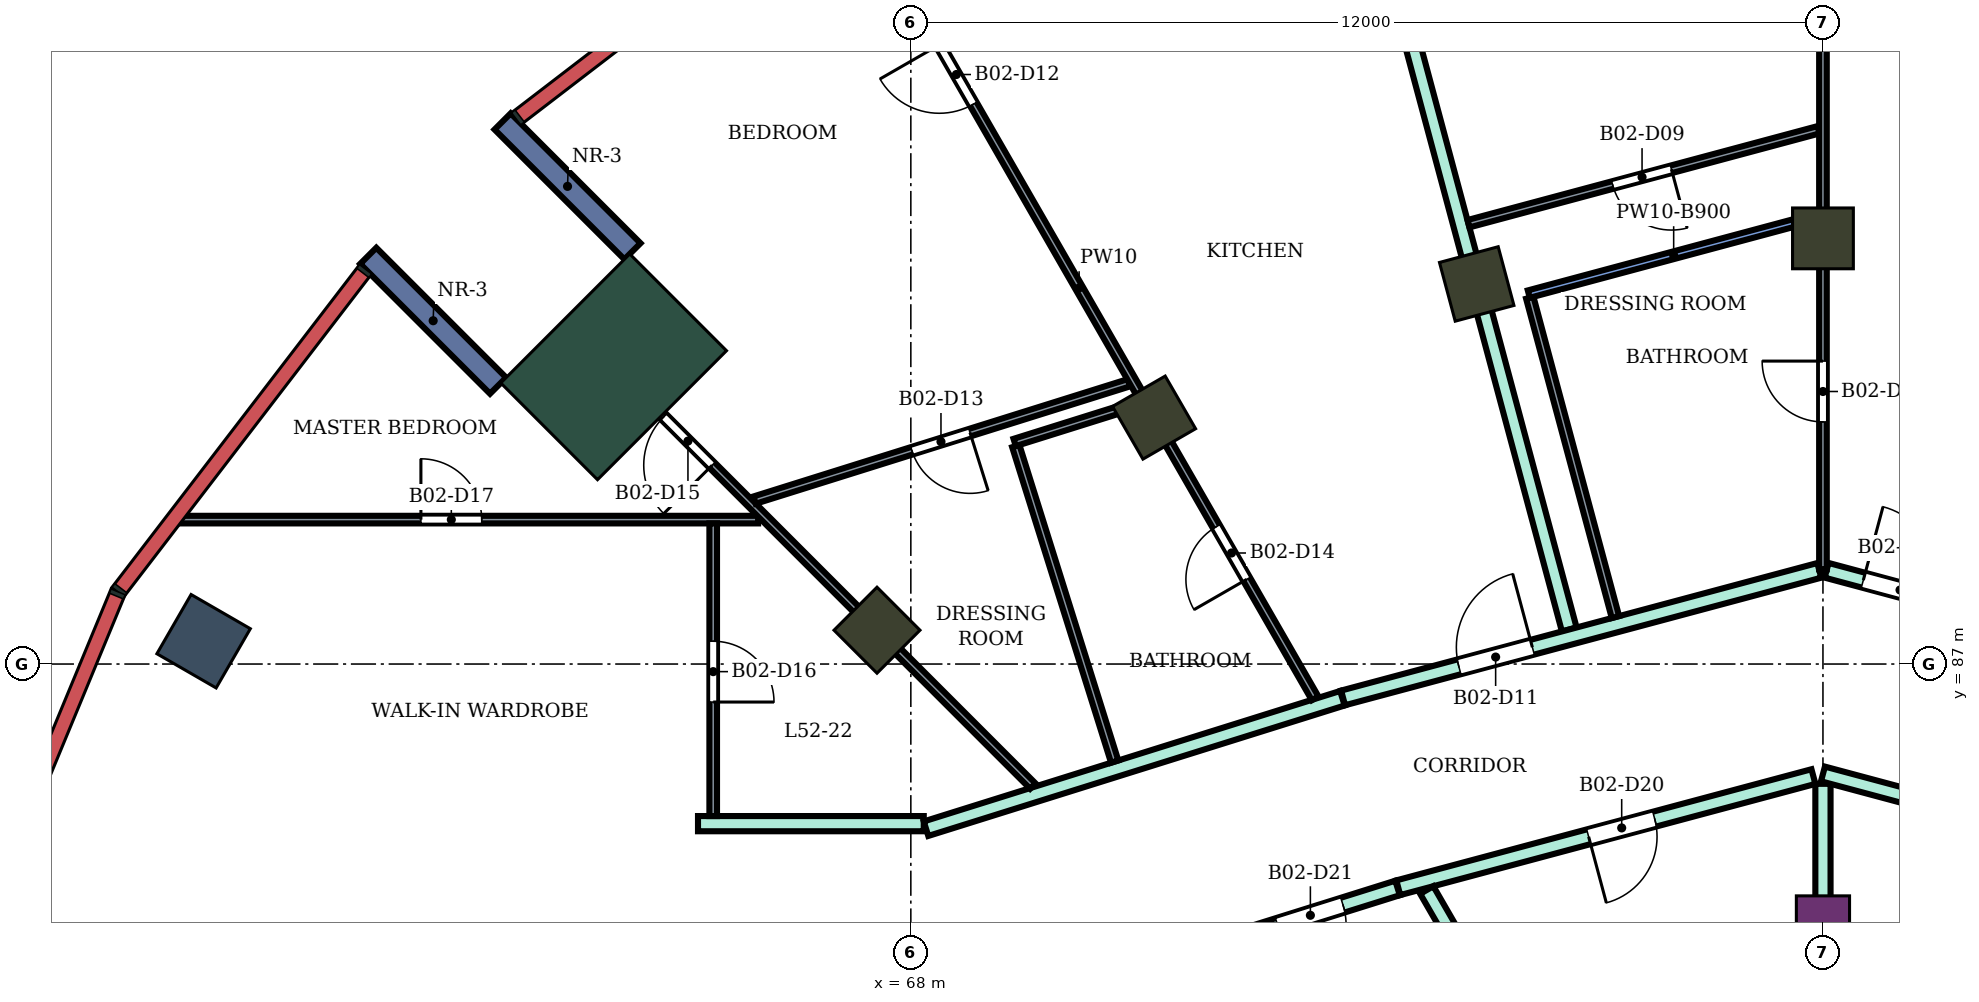
"""IFC4 building model, lengths in metres.
Left out: names, types, materials, properties, quantities, classifications, styles, units other than length and angle.
Written with IfcOpenShell. Run it as: python <this file> out.ifc"""

import sys

from ifc_helpers import new_model, si_unit, direction, frame, frame_2d, origin, origin_2d, place, context, subcontext, project, spatial, rectangle, extrude, element, fill, save


model = new_model("IFC4")
c1 = context("Model", 3, precision=1e-05, world=origin(), true_north=direction((0.0, 1.0)))
c2 = subcontext(c1, "Body", "Model", "MODEL_VIEW")
j1 = project(units=[si_unit("LENGTHUNIT", "METRE"), si_unit("PLANEANGLEUNIT", "RADIAN")], contexts=[c1])
p1 = place(None, origin())
s1 = spatial("IfcSite", under=j1, at=p1, CompositionType="ELEMENT")
p2 = place(p1, origin())
s2 = spatial("IfcBuilding", under=s1, at=p2, CompositionType="ELEMENT")
p3 = place(p2, frame((0.0, 0.0, 225.1)))
s3 = spatial("IfcBuildingStorey", under=s2, at=p3, CompositionType="ELEMENT", Elevation=225.1)
p4 = place(p3, frame((58.696, 87.3, 0.0), z_axis=(0.0, 0.0, 1.0), x_axis=(-0.866025403784, 0.5, 0.0)))
e1 = element("IfcColumn", 1, at=p4, inside=s3, PredefinedType="COLUMN", context=c2, shape_type="SweptSolid", body=[
    extrude(rectangle(XDim=0.9, YDim=0.9, at=origin_2d()), origin(), (0.0, 0.0, 1.0), 4.2),
])
for number, where, z_axis, x_axis in (
    (2, (80.0, 92.6, 0.0), (0.0, 0.0, 1.0), (0.0, 1.0, 0.0)),
    (3, (75.445, 92.0, 0.0), (0.0, 0.0, 1.0), (-0.259, 0.966, 0.0)),
    (4, (71.2, 90.242, 0.0), (0.0, 0.0, 1.0), (-0.5, 0.866, 0.0)),
    (5, (67.555, 87.445, 0.0), (0.0, 0.0, 1.0), (-0.707, 0.707, 0.0)),
):
    element("IfcColumn", number, at=place(p3, frame(where, z_axis=z_axis, x_axis=x_axis)), inside=s3, PredefinedType="COLUMN", context=c2, shape_type="SweptSolid", body=[
        extrude(rectangle(XDim=0.8, YDim=0.8, at=origin_2d()), origin(), (0.0, 0.0, 1.0), 4.2),
    ])
p5 = place(p3, frame((80.0, 83.6, 0.0), z_axis=(0.0, 0.0, 1.0), x_axis=(0.0, 1.0, 0.0)))
e6 = element("IfcColumn", 6, at=p5, inside=s3, PredefinedType="COLUMN", context=c2, shape_type="SweptSolid", body=[
    extrude(rectangle(XDim=0.7, YDim=0.7, at=origin_2d()), origin(), (0.0, 0.0, 1.0), 4.2),
])
p6 = place(p3, frame((64.09, 90.91, 0.0), z_axis=(0.0, 0.0, 1.0), x_axis=(-0.707106781187, 0.707106781187, 0.0)))
e7 = element("IfcColumn", 7, at=p6, inside=s3, PredefinedType="COLUMN", context=c2, shape_type="SweptSolid", body=[
    extrude(rectangle(XDim=1.8, YDim=2.4, at=origin_2d()), origin(), (0.0, 0.0, 1.0), 4.2),
])
for number, where, z_axis, x_axis in (
    (8, (64.338, 92.43, 0.0), (0.0, 0.0, 1.0), (-0.707, 0.707, 0.0)),
    (9, (62.57, 90.662, 0.0), (0.0, 0.0, 1.0), (-0.707, 0.707, 0.0)),
):
    element("IfcWall", number, at=place(p3, frame(where, z_axis=z_axis, x_axis=x_axis)), inside=s3, PredefinedType="NOTDEFINED", context=c2, shape_type="SweptSolid", body=[
        extrude(rectangle(XDim=2.416, YDim=0.3, at=frame_2d((1.208, 0.0))), origin(), (0.0, 0.0, 1.0), 4.2),
    ])
p7 = place(p3, frame((65.2, 84.9, 0.0), z_axis=(0.0, 0.0, 1.0), x_axis=(1.0, 0.0, 0.0)))
e10 = element("IfcWall", 10, at=p7, inside=s3, PredefinedType="PARTITIONING", context=c2, shape_type="SweptSolid", body=[
    extrude(rectangle(XDim=2.97, YDim=0.2, at=frame_2d((1.485, 0.0))), origin(), (0.0, 0.0, 1.0), 3.75),
])
p8 = place(p3, frame((68.2, 84.834, 0.0), z_axis=(0.0, 0.0, 1.0), x_axis=(0.954260265251, 0.298977166624, 0.0)))
e11 = element("IfcWall", 11, at=p8, inside=s3, PredefinedType="PARTITIONING", context=c2, shape_type="SweptSolid", body=[
    extrude(rectangle(XDim=5.741, YDim=0.2, at=frame_2d((2.87, 0.0))), origin(), (0.0, 0.0, 1.0), 3.75),
])
p9 = place(p3, frame((72.1, 83.332, 0.0), z_axis=(0.0, 0.0, 1.0), x_axis=(0.954233106619, 0.299063836383, 0.0)))
e12 = element("IfcWall", 12, at=p9, inside=s3, PredefinedType="PARTITIONING", context=c2, shape_type="SweptSolid", body=[
    extrude(rectangle(XDim=2.414, YDim=0.2, at=frame_2d((1.207, 0.0))), origin(), (0.0, 0.0, 1.0), 3.75),
])
p10 = place(p9, frame((0.762, 0.0, 0.0)))
e13 = element("IfcOpeningElement", 13, at=p10, cuts=e12, PredefinedType="OPENING", context=c2, shape_type="SweptSolid", body=[
    extrude(rectangle(XDim=0.9, YDim=2.1, at=frame_2d((0.45, 1.05))), frame((0.0, 0.11, 0.0), z_axis=(0.0, -1.0, 0.0), x_axis=(1.0, 0.0, 0.0)), (0.0, 0.0, 1.0), 0.22),
])
p11 = place(p3, frame((73.323, 99.919, 0.0), z_axis=(0.0, 0.0, 1.0), x_axis=(0.258768239436, -0.965939438194, 0.0)))
e14 = element("IfcWall", 14, at=p11, inside=s3, PredefinedType="PARTITIONING", context=c2, shape_type="SweptSolid", body=[
    extrude(rectangle(XDim=12.904, YDim=0.2, at=frame_2d((6.452, 0.0))), origin(), (0.0, 0.0, 1.0), 3.75),
])
p12 = place(p3, frame((73.687, 86.554, 0.0), z_axis=(0.0, 0.0, 1.0), x_axis=(0.96595258731, 0.258719150952, 0.0)))
e15 = element("IfcWall", 15, at=p12, inside=s3, PredefinedType="PARTITIONING", context=c2, shape_type="SweptSolid", body=[
    extrude(rectangle(XDim=6.486, YDim=0.2, at=frame_2d((3.243, 0.0))), origin(), (0.0, 0.0, 1.0), 3.75),
])
p13 = place(p12, frame((1.578, 0.0, 0.0)))
e16 = element("IfcOpeningElement", 16, at=p13, cuts=e15, PredefinedType="OPENING", context=c2, shape_type="SweptSolid", body=[
    extrude(rectangle(XDim=1.0, YDim=2.1, at=frame_2d((0.5, 1.05))), frame((0.0, 0.11, 0.0), z_axis=(0.0, -1.0, 0.0), x_axis=(1.0, 0.0, 0.0)), (0.0, 0.0, 1.0), 0.22),
])
p14 = place(p3, frame((74.413, 84.057, 0.0), z_axis=(0.0, 0.0, 1.0), x_axis=(0.965972135939, 0.258646153246, 0.0)))
e17 = element("IfcWall", 17, at=p14, inside=s3, PredefinedType="PARTITIONING", context=c2, shape_type="SweptSolid", body=[
    extrude(rectangle(XDim=5.654, YDim=0.2, at=frame_2d((2.827, 0.0))), origin(), (0.0, 0.0, 1.0), 3.75),
])
p15 = place(p14, frame((2.593, 0.0, 0.0)))
e18 = element("IfcOpeningElement", 18, at=p15, cuts=e17, PredefinedType="OPENING", context=c2, shape_type="SweptSolid", body=[
    extrude(rectangle(XDim=0.9, YDim=2.1, at=frame_2d((0.45, 1.05))), frame((0.0, 0.11, 0.0), z_axis=(0.0, -1.0, 0.0), x_axis=(1.0, 0.0, 0.0)), (0.0, 0.0, 1.0), 0.22),
])
p16 = place(p3, frame((74.787, 84.027, 0.0), z_axis=(0.0, 0.0, 1.0), x_axis=(0.500079107518, -0.86597972622, 0.0)))
e19 = element("IfcWall", 19, at=p16, inside=s3, PredefinedType="PARTITIONING", context=c2, shape_type="SweptSolid", body=[
    extrude(rectangle(XDim=2.726, YDim=0.2, at=frame_2d((1.363, 0.0))), origin(), (0.0, 0.0, 1.0), 3.75),
])
p17 = place(p3, frame((80.0, 82.699, 0.0), z_axis=(0.0, 0.0, 1.0), x_axis=(0.0, 1.0, 0.0)))
e20 = element("IfcWall", 20, at=p17, inside=s3, PredefinedType="PARTITIONING", context=c2, shape_type="SweptSolid", body=[
    extrude(rectangle(XDim=2.725, YDim=0.2, at=frame_2d((1.363, 0.0))), origin(), (0.0, 0.0, 1.0), 3.75),
])
p18 = place(p3, frame((80.0, 85.554, 0.0), z_axis=(0.0, 0.0, 1.0), x_axis=(0.965928989968, -0.258807237802, 0.0)))
e21 = element("IfcWall", 21, at=p18, inside=s3, PredefinedType="PARTITIONING", context=c2, shape_type="SweptSolid", body=[
    extrude(rectangle(XDim=5.774, YDim=0.2, at=frame_2d((2.887, 0.0))), origin(), (0.0, 0.0, 1.0), 3.75),
])
p19 = place(p18, frame((2.292, 0.0, 0.0)))
e22 = element("IfcOpeningElement", 22, at=p19, cuts=e21, PredefinedType="OPENING", context=c2, shape_type="SweptSolid", body=[
    extrude(rectangle(XDim=0.9, YDim=2.1, at=frame_2d((0.45, 1.05))), frame((0.0, 0.11, 0.0), z_axis=(0.0, -1.0, 0.0), x_axis=(1.0, 0.0, 0.0)), (0.0, 0.0, 1.0), 0.22),
])
p20 = place(p3, frame((80.048, 88.233, 0.0), z_axis=(0.0, 0.0, 1.0), x_axis=(0.965865387308, -0.259044501198, 0.0)))
e23 = element("IfcWall", 23, at=p20, inside=s3, PredefinedType="PARTITIONING", context=c2, shape_type="SweptSolid", body=[
    extrude(rectangle(XDim=6.476, YDim=0.2, at=frame_2d((3.238, 0.0))), origin(), (0.0, 0.0, 1.0), 3.75),
])
p21 = place(p20, frame((0.5, 0.0, 0.0)))
e24 = element("IfcOpeningElement", 24, at=p21, cuts=e23, PredefinedType="OPENING", context=c2, shape_type="SweptSolid", body=[
    extrude(rectangle(XDim=1.0, YDim=2.1, at=frame_2d((0.5, 1.05))), frame((0.0, 0.11, 0.0), z_axis=(0.0, -1.0, 0.0), x_axis=(1.0, 0.0, 0.0)), (0.0, 0.0, 1.0), 0.22),
])
p22 = place(p3, frame((58.379, 88.9, 0.0), z_axis=(0.0, 0.0, 1.0), x_axis=(1.0, 0.0, 0.0)))
e25 = element("IfcWall", 25, at=p22, inside=s3, PredefinedType="PARTITIONING", context=c2, shape_type="SweptSolid", body=[
    extrude(rectangle(XDim=7.612, YDim=0.1, at=frame_2d((3.806, 0.0))), origin(), (0.0, 0.0, 1.0), 3.75),
])
p23 = place(p22, frame((3.176, 0.0, 0.0)))
e26 = element("IfcOpeningElement", 26, at=p23, cuts=e25, PredefinedType="OPENING", context=c2, shape_type="SweptSolid", body=[
    extrude(rectangle(XDim=0.8, YDim=2.1, at=frame_2d((0.4, 1.05))), frame((0.0, 0.06, 0.0), z_axis=(0.0, -1.0, 0.0), x_axis=(1.0, 0.0, 0.0)), (0.0, 0.0, 1.0), 0.12),
])
p24 = place(p3, frame((63.596, 91.406, 0.0), z_axis=(0.0, 0.0, 1.0), x_axis=(0.70700623685, -0.707207311228, 0.0)))
e27 = element("IfcWall", 27, at=p24, inside=s3, PredefinedType="PARTITIONING", context=c2, shape_type="SweptSolid", body=[
    extrude(rectangle(XDim=8.499, YDim=0.1, at=frame_2d((4.25, 0.0))), origin(), (0.0, 0.0, 1.0), 3.75),
])
p25 = place(p24, frame((1.632, 0.0, 0.0)))
e28 = element("IfcOpeningElement", 28, at=p25, cuts=e27, PredefinedType="OPENING", context=c2, shape_type="SweptSolid", body=[
    extrude(rectangle(XDim=0.9, YDim=2.1, at=frame_2d((0.45, 1.05))), frame((0.0, 0.06, 0.0), z_axis=(0.0, -1.0, 0.0), x_axis=(1.0, 0.0, 0.0)), (0.0, 0.0, 1.0), 0.12),
])
p26 = place(p3, frame((65.4, 85.0, 0.0), z_axis=(0.0, 0.0, 1.0), x_axis=(0.0, 1.0, 0.0)))
e29 = element("IfcWall", 29, at=p26, inside=s3, PredefinedType="PARTITIONING", context=c2, shape_type="SweptSolid", body=[
    extrude(rectangle(XDim=3.85, YDim=0.1, at=frame_2d((1.925, 0.0))), origin(), (0.0, 0.0, 1.0), 3.75),
])
p27 = place(p26, frame((1.5, 0.0, 0.0)))
e30 = element("IfcOpeningElement", 30, at=p27, cuts=e29, PredefinedType="OPENING", context=c2, shape_type="SweptSolid", body=[
    extrude(rectangle(XDim=0.8, YDim=2.1, at=frame_2d((0.4, 1.05))), frame((0.0, 0.06, 0.0), z_axis=(0.0, -1.0, 0.0), x_axis=(1.0, 0.0, 0.0)), (0.0, 0.0, 1.0), 0.12),
])
p28 = place(p3, frame((65.944, 89.157, 0.0), z_axis=(0.0, 0.0, 1.0), x_axis=(0.954235485309, 0.299056246512, 0.0)))
e31 = element("IfcWall", 31, at=p28, inside=s3, PredefinedType="PARTITIONING", context=c2, shape_type="SweptSolid", body=[
    extrude(rectangle(XDim=5.159, YDim=0.1, at=frame_2d((2.58, 0.0))), origin(), (0.0, 0.0, 1.0), 3.75),
])
p29 = place(p28, frame((2.17, 0.0, 0.0)))
e32 = element("IfcOpeningElement", 32, at=p29, cuts=e31, PredefinedType="OPENING", context=c2, shape_type="SweptSolid", body=[
    extrude(rectangle(XDim=0.8, YDim=2.1, at=frame_2d((0.4, 1.05))), frame((0.0, 0.06, 0.0), z_axis=(0.0, -1.0, 0.0), x_axis=(1.0, 0.0, 0.0)), (0.0, 0.0, 1.0), 0.12),
])
p30 = place(p3, frame((67.109, 97.346, 0.0), z_axis=(0.0, 0.0, 1.0), x_axis=(0.498583439824, -0.866841711925, 0.0)))
e33 = element("IfcWall", 33, at=p30, inside=s3, PredefinedType="PARTITIONING", context=c2, shape_type="SweptSolid", body=[
    extrude(rectangle(XDim=12.456, YDim=0.1, at=frame_2d((6.228, 0.0))), origin(), (0.0, 0.0, 1.0), 3.75),
])
p31 = place(p30, frame((2.538, 0.0, 0.0)))
e34 = element("IfcOpeningElement", 34, at=p31, cuts=e33, PredefinedType="OPENING", context=c2, shape_type="SweptSolid", body=[
    extrude(rectangle(XDim=0.9, YDim=2.1, at=frame_2d((0.45, 1.05))), frame((0.0, 0.06, 0.0), z_axis=(0.0, -1.0, 0.0), x_axis=(1.0, 0.0, 0.0)), (0.0, 0.0, 1.0), 0.12),
])
p32 = place(p30, frame((9.85, 0.0, 0.0)))
e35 = element("IfcOpeningElement", 35, at=p32, cuts=e33, PredefinedType="OPENING", context=c2, shape_type="SweptSolid", body=[
    extrude(rectangle(XDim=0.8, YDim=2.1, at=frame_2d((0.4, 1.05))), frame((0.0, 0.06, 0.0), z_axis=(0.0, -1.0, 0.0), x_axis=(1.0, 0.0, 0.0)), (0.0, 0.0, 1.0), 0.12),
])
p33 = place(p3, frame((69.381, 89.867, 0.0), z_axis=(0.0, 0.0, 1.0), x_axis=(0.29908659099, -0.954225974856, 0.0)))
e36 = element("IfcWall", 36, at=p33, inside=s3, PredefinedType="PARTITIONING", context=c2, shape_type="SweptSolid", body=[
    extrude(rectangle(XDim=4.35, YDim=0.1, at=frame_2d((2.175, 0.0))), origin(), (0.0, 0.0, 1.0), 3.75),
])
p34 = place(p3, frame((69.366, 89.915, 0.0), z_axis=(0.0, 0.0, 1.0), x_axis=(0.954163830168, 0.299284789457, 0.0)))
e37 = element("IfcWall", 37, at=p34, inside=s3, PredefinedType="PARTITIONING", context=c2, shape_type="SweptSolid", body=[
    extrude(rectangle(XDim=1.734, YDim=0.1, at=frame_2d((0.867, 0.0))), origin(), (0.0, 0.0, 1.0), 3.75),
])
p35 = place(p3, frame((75.337, 92.793, 0.0), z_axis=(0.0, 0.0, 1.0), x_axis=(0.965840336715, 0.259137886026, 0.0)))
e38 = element("IfcWall", 38, at=p35, inside=s3, PredefinedType="PARTITIONING", context=c2, shape_type="SweptSolid", body=[
    extrude(rectangle(XDim=4.768, YDim=0.1, at=frame_2d((2.384, 0.0))), origin(), (0.0, 0.0, 1.0), 3.75),
])
p36 = place(p35, frame((1.964, 0.0, 0.0)))
e39 = element("IfcOpeningElement", 39, at=p36, cuts=e38, PredefinedType="OPENING", context=c2, shape_type="SweptSolid", body=[
    extrude(rectangle(XDim=0.8, YDim=2.1, at=frame_2d((0.4, 1.05))), frame((0.0, 0.06, 0.0), z_axis=(0.0, -1.0, 0.0), x_axis=(1.0, 0.0, 0.0)), (0.0, 0.0, 1.0), 0.12),
])
p37 = place(p3, frame((76.143, 91.819, 0.0), z_axis=(0.0, 0.0, 1.0), x_axis=(0.259115794116, -0.965846263771, 0.0)))
e40 = element("IfcWall", 40, at=p37, inside=s3, PredefinedType="PARTITIONING", context=c2, shape_type="SweptSolid", body=[
    extrude(rectangle(XDim=4.349, YDim=0.1, at=frame_2d((2.175, 0.0))), origin(), (0.0, 0.0, 1.0), 3.75),
])
p38 = place(p3, frame((76.13, 91.867, 0.0), z_axis=(0.0, 0.0, 1.0), x_axis=(0.965860204905, 0.259063823373, 0.0)))
e41 = element("IfcWall", 41, at=p38, inside=s3, PredefinedType="PARTITIONING", context=c2, shape_type="SweptSolid", body=[
    extrude(rectangle(XDim=3.947, YDim=0.1, at=frame_2d((1.973, 0.0))), origin(), (0.0, 0.0, 1.0), 3.3),
])
p39 = place(p3, frame((80.0, 88.246, 0.0), z_axis=(0.0, 0.0, 1.0), x_axis=(0.0, 1.0, 0.0)))
e42 = element("IfcWall", 42, at=p39, inside=s3, PredefinedType="PARTITIONING", context=c2, shape_type="SweptSolid", body=[
    extrude(rectangle(XDim=9.954, YDim=0.1, at=frame_2d((4.977, 0.0))), origin(), (0.0, 0.0, 1.0), 3.75),
])
p40 = place(p39, frame((7.401, 0.0, 0.0)))
e43 = element("IfcOpeningElement", 43, at=p40, cuts=e42, PredefinedType="OPENING", context=c2, shape_type="SweptSolid", body=[
    extrude(rectangle(XDim=0.9, YDim=2.1, at=frame_2d((0.45, 1.05))), frame((0.0, 0.06, 0.0), z_axis=(0.0, -1.0, 0.0), x_axis=(1.0, 0.0, 0.0)), (0.0, 0.0, 1.0), 0.12),
])
p41 = place(p39, frame((1.939, 0.0, 0.0)))
e44 = element("IfcOpeningElement", 44, at=p41, cuts=e42, PredefinedType="OPENING", context=c2, shape_type="SweptSolid", body=[
    extrude(rectangle(XDim=0.8, YDim=2.1, at=frame_2d((0.4, 1.05))), frame((0.0, 0.06, 0.0), z_axis=(0.0, -1.0, 0.0), x_axis=(1.0, 0.0, 0.0)), (0.0, 0.0, 1.0), 0.12),
])
p42 = place(p21, origin())
e45 = element("IfcDoor", 45, at=p42, inside=s3, OperationType="SINGLE_SWING_LEFT", PredefinedType="DOOR", context=c2, shape_type="SweptSolid", body=[
    extrude(rectangle(XDim=1.0, YDim=2.1, at=frame_2d((0.5, 1.05))), frame((0.0, 0.025, 0.0), z_axis=(0.0, -1.0, 0.0), x_axis=(1.0, 0.0, 0.0)), (0.0, 0.0, 1.0), 0.05),
])
fill(e24, e45)
p43 = place(p36, frame((0.8, 0.0, 0.0), z_axis=(0.0, 0.0, 1.0), x_axis=(-1.0, 0.0, 0.0)))
e46 = element("IfcDoor", 46, at=p43, inside=s3, OperationType="SINGLE_SWING_LEFT", PredefinedType="DOOR", context=c2, shape_type="SweptSolid", body=[
    extrude(rectangle(XDim=0.8, YDim=2.1, at=frame_2d((0.4, 1.05))), frame((0.0, 0.025, 0.0), z_axis=(0.0, -1.0, 0.0), x_axis=(1.0, 0.0, 0.0)), (0.0, 0.0, 1.0), 0.05),
])
fill(e39, e46)
p44 = place(p41, origin())
e47 = element("IfcDoor", 47, at=p44, inside=s3, OperationType="SINGLE_SWING_RIGHT", PredefinedType="DOOR", context=c2, shape_type="SweptSolid", body=[
    extrude(rectangle(XDim=0.8, YDim=2.1, at=frame_2d((0.4, 1.05))), frame((0.0, 0.025, 0.0), z_axis=(0.0, -1.0, 0.0), x_axis=(1.0, 0.0, 0.0)), (0.0, 0.0, 1.0), 0.05),
])
fill(e44, e47)
p45 = place(p13, origin())
e48 = element("IfcDoor", 48, at=p45, inside=s3, OperationType="SINGLE_SWING_RIGHT", PredefinedType="DOOR", context=c2, shape_type="SweptSolid", body=[
    extrude(rectangle(XDim=1.0, YDim=2.1, at=frame_2d((0.5, 1.05))), frame((0.0, 0.025, 0.0), z_axis=(0.0, -1.0, 0.0), x_axis=(1.0, 0.0, 0.0)), (0.0, 0.0, 1.0), 0.05),
])
fill(e16, e48)
p46 = place(p31, frame((0.9, 0.0, 0.0), z_axis=(0.0, 0.0, 1.0), x_axis=(-1.0, 0.0, 0.0)))
e49 = element("IfcDoor", 49, at=p46, inside=s3, OperationType="SINGLE_SWING_RIGHT", PredefinedType="DOOR", context=c2, shape_type="SweptSolid", body=[
    extrude(rectangle(XDim=0.9, YDim=2.1, at=frame_2d((0.45, 1.05))), frame((0.0, 0.025, 0.0), z_axis=(0.0, -1.0, 0.0), x_axis=(1.0, 0.0, 0.0)), (0.0, 0.0, 1.0), 0.05),
])
fill(e34, e49)
p47 = place(p29, frame((0.8, 0.0, 0.0), z_axis=(0.0, 0.0, 1.0), x_axis=(-1.0, 0.0, 0.0)))
e50 = element("IfcDoor", 50, at=p47, inside=s3, OperationType="SINGLE_SWING_LEFT", PredefinedType="DOOR", context=c2, shape_type="SweptSolid", body=[
    extrude(rectangle(XDim=0.8, YDim=2.1, at=frame_2d((0.4, 1.05))), frame((0.0, 0.025, 0.0), z_axis=(0.0, -1.0, 0.0), x_axis=(1.0, 0.0, 0.0)), (0.0, 0.0, 1.0), 0.05),
])
fill(e32, e50)
p48 = place(p32, frame((0.8, 0.0, 0.0), z_axis=(0.0, 0.0, 1.0), x_axis=(-1.0, 0.0, 0.0)))
e51 = element("IfcDoor", 51, at=p48, inside=s3, OperationType="SINGLE_SWING_LEFT", PredefinedType="DOOR", context=c2, shape_type="SweptSolid", body=[
    extrude(rectangle(XDim=0.8, YDim=2.1, at=frame_2d((0.4, 1.05))), frame((0.0, 0.025, 0.0), z_axis=(0.0, -1.0, 0.0), x_axis=(1.0, 0.0, 0.0)), (0.0, 0.0, 1.0), 0.05),
])
fill(e35, e51)
p49 = place(p25, frame((0.9, 0.0, 0.0), z_axis=(0.0, 0.0, 1.0), x_axis=(-1.0, 0.0, 0.0)))
e52 = element("IfcDoor", 52, at=p49, inside=s3, OperationType="SINGLE_SWING_LEFT", PredefinedType="DOOR", context=c2, shape_type="SweptSolid", body=[
    extrude(rectangle(XDim=0.9, YDim=2.1, at=frame_2d((0.45, 1.05))), frame((0.0, 0.025, 0.0), z_axis=(0.0, -1.0, 0.0), x_axis=(1.0, 0.0, 0.0)), (0.0, 0.0, 1.0), 0.05),
])
fill(e28, e52)
p50 = place(p27, frame((0.8, 0.0, 0.0), z_axis=(0.0, 0.0, 1.0), x_axis=(-1.0, 0.0, 0.0)))
e53 = element("IfcDoor", 53, at=p50, inside=s3, OperationType="SINGLE_SWING_RIGHT", PredefinedType="DOOR", context=c2, shape_type="SweptSolid", body=[
    extrude(rectangle(XDim=0.8, YDim=2.1, at=frame_2d((0.4, 1.05))), frame((0.0, 0.025, 0.0), z_axis=(0.0, -1.0, 0.0), x_axis=(1.0, 0.0, 0.0)), (0.0, 0.0, 1.0), 0.05),
])
fill(e30, e53)
p51 = place(p23, origin())
e54 = element("IfcDoor", 54, at=p51, inside=s3, OperationType="SINGLE_SWING_LEFT", PredefinedType="DOOR", context=c2, shape_type="SweptSolid", body=[
    extrude(rectangle(XDim=0.8, YDim=2.1, at=frame_2d((0.4, 1.05))), frame((0.0, 0.025, 0.0), z_axis=(0.0, -1.0, 0.0), x_axis=(1.0, 0.0, 0.0)), (0.0, 0.0, 1.0), 0.05),
])
fill(e26, e54)
p52 = place(p15, frame((0.9, 0.0, 0.0), z_axis=(0.0, 0.0, 1.0), x_axis=(-1.0, 0.0, 0.0)))
e55 = element("IfcDoor", 55, at=p52, inside=s3, OperationType="SINGLE_SWING_RIGHT", PredefinedType="DOOR", context=c2, shape_type="SweptSolid", body=[
    extrude(rectangle(XDim=0.9, YDim=2.1, at=frame_2d((0.45, 1.05))), frame((0.0, 0.025, 0.0), z_axis=(0.0, -1.0, 0.0), x_axis=(1.0, 0.0, 0.0)), (0.0, 0.0, 1.0), 0.05),
])
fill(e18, e55)
p53 = place(p10, frame((0.9, 0.0, 0.0), z_axis=(0.0, 0.0, 1.0), x_axis=(-1.0, 0.0, 0.0)))
e56 = element("IfcDoor", 56, at=p53, inside=s3, OperationType="SINGLE_SWING_RIGHT", PredefinedType="DOOR", context=c2, shape_type="SweptSolid", body=[
    extrude(rectangle(XDim=0.9, YDim=2.1, at=frame_2d((0.45, 1.05))), frame((0.0, 0.025, 0.0), z_axis=(0.0, -1.0, 0.0), x_axis=(1.0, 0.0, 0.0)), (0.0, 0.0, 1.0), 0.05),
])
fill(e13, e56)
save(model, sys.argv[1])
